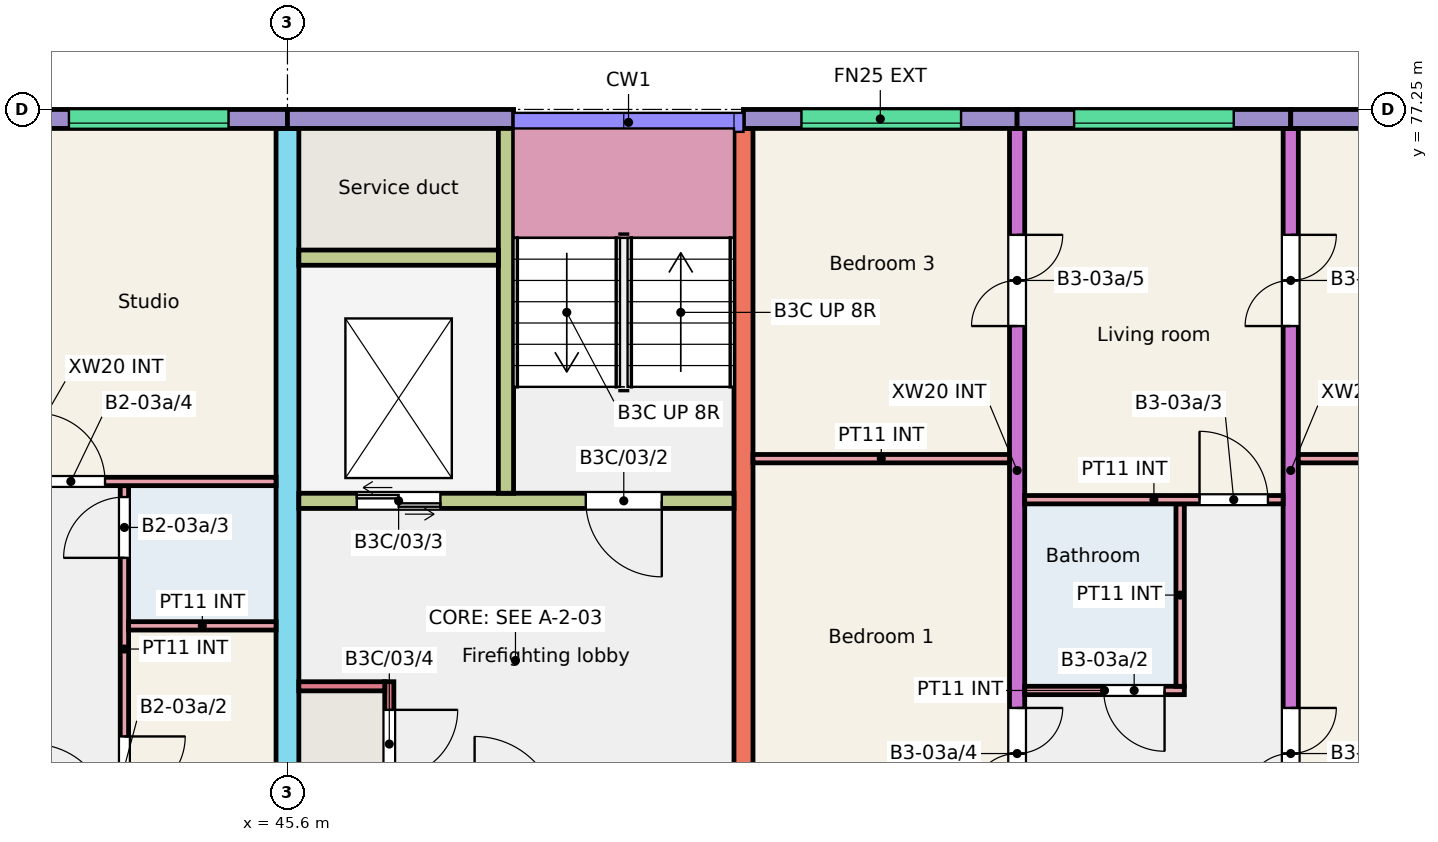
"""IFC4 building model, lengths in metres.
Left out: names, types, materials, properties, quantities, classifications, styles, units other than length and angle.
Written with IfcOpenShell. Run it as: python <this file> out.ifc"""

import sys

from ifc_helpers import new_model, si_unit, direction, frame, frame_2d, origin, place, context, subcontext, project, spatial, rectangle, extrude, element, fill, save


model = new_model("IFC4")
c1 = context("Model", 3, precision=1e-05, world=origin(), true_north=direction((0.0, 1.0)))
c2 = subcontext(c1, "Body", "Model", "MODEL_VIEW")
j1 = project(units=[si_unit("LENGTHUNIT", "METRE"), si_unit("PLANEANGLEUNIT", "RADIAN")], contexts=[c1])
p1 = place(None, origin())
s1 = spatial("IfcSite", under=j1, at=p1, CompositionType="ELEMENT")
p2 = place(p1, origin())
s2 = spatial("IfcBuilding", under=s1, at=p2, CompositionType="ELEMENT")
p3 = place(p2, frame((0.0, 0.0, 9.0)))
s3 = spatial("IfcBuildingStorey", under=s2, at=p3, CompositionType="ELEMENT", Elevation=9.0)
p4 = place(p3, frame((45.6, 66.0, 0.0), z_axis=(0.0, 0.0, 1.0), x_axis=(0.0, 1.0, 0.0)))
e1 = element("IfcWall", 1, at=p4, inside=s3, PredefinedType="SHEAR", context=c2, shape_type="SweptSolid", body=[
    extrude(rectangle(XDim=11.0, YDim=0.3, at=frame_2d((5.5, 0.0))), origin(), (0.0, 0.0, 1.0), 3.0),
])
p5 = place(p4, frame((0.3, 0.0, 0.0)))
e2 = element("IfcOpeningElement", 2, at=p5, cuts=e1, PredefinedType="OPENING", context=c2, shape_type="SweptSolid", body=[
    extrude(rectangle(XDim=1.2, YDim=2.1, at=frame_2d((0.6, 1.05))), frame((0.0, 0.16, 0.0), z_axis=(0.0, -1.0, 0.0), x_axis=(1.0, 0.0, 0.0)), (0.0, 0.0, 1.0), 0.32),
])
p6 = place(p3, frame((51.6, 68.0, 0.0), z_axis=(0.0, 0.0, 1.0), x_axis=(0.0, 1.0, 0.0)))
e3 = element("IfcWall", 3, at=p6, inside=s3, PredefinedType="SHEAR", context=c2, shape_type="SweptSolid", body=[
    extrude(rectangle(XDim=9.0, YDim=0.25, at=frame_2d((4.5, 0.0))), origin(), (0.0, 0.0, 1.0), 3.0),
])
p7 = place(p3, frame((55.2, 68.0, 0.0), z_axis=(0.0, 0.0, 1.0), x_axis=(0.0, 1.0, 0.0)))
e4 = element("IfcWall", 4, at=p7, inside=s3, PredefinedType="SHEAR", context=c2, shape_type="SweptSolid", body=[
    extrude(rectangle(XDim=9.0, YDim=0.2, at=frame_2d((4.5, 0.0))), origin(), (0.0, 0.0, 1.0), 3.0),
])
p8 = place(p7, frame((0.175, 0.0, 0.0)))
e5 = element("IfcOpeningElement", 5, at=p8, cuts=e4, PredefinedType="OPENING", context=c2, shape_type="SweptSolid", body=[
    extrude(rectangle(XDim=1.2, YDim=2.1, at=frame_2d((0.6, 1.05))), frame((0.0, 0.11, 0.0), z_axis=(0.0, -1.0, 0.0), x_axis=(1.0, 0.0, 0.0)), (0.0, 0.0, 1.0), 0.22),
])
p9 = place(p7, frame((6.4, 0.0, 0.0)))
e6 = element("IfcOpeningElement", 6, at=p9, cuts=e4, PredefinedType="OPENING", context=c2, shape_type="SweptSolid", body=[
    extrude(rectangle(XDim=1.2, YDim=2.1, at=frame_2d((0.6, 1.05))), frame((0.0, 0.11, 0.0), z_axis=(0.0, -1.0, 0.0), x_axis=(1.0, 0.0, 0.0)), (0.0, 0.0, 1.0), 0.22),
])
p10 = place(p3, frame((58.8, 68.0, 0.0), z_axis=(0.0, 0.0, 1.0), x_axis=(0.0, 1.0, 0.0)))
e7 = element("IfcWall", 7, at=p10, inside=s3, PredefinedType="SHEAR", context=c2, shape_type="SweptSolid", body=[
    extrude(rectangle(XDim=9.0, YDim=0.2, at=frame_2d((4.5, 0.0))), origin(), (0.0, 0.0, 1.0), 3.0),
])
p11 = place(p10, frame((0.175, 0.0, 0.0)))
e8 = element("IfcOpeningElement", 8, at=p11, cuts=e7, PredefinedType="OPENING", context=c2, shape_type="SweptSolid", body=[
    extrude(rectangle(XDim=1.2, YDim=2.1, at=frame_2d((0.6, 1.05))), frame((0.0, 0.11, 0.0), z_axis=(0.0, -1.0, 0.0), x_axis=(1.0, 0.0, 0.0)), (0.0, 0.0, 1.0), 0.22),
])
p12 = place(p10, frame((6.4, 0.0, 0.0)))
e9 = element("IfcOpeningElement", 9, at=p12, cuts=e7, PredefinedType="OPENING", context=c2, shape_type="SweptSolid", body=[
    extrude(rectangle(XDim=1.2, YDim=2.1, at=frame_2d((0.6, 1.05))), frame((0.0, 0.11, 0.0), z_axis=(0.0, -1.0, 0.0), x_axis=(1.0, 0.0, 0.0)), (0.0, 0.0, 1.0), 0.22),
])
p13 = place(p3, frame((42.0, 77.125, 0.0), z_axis=(0.0, 0.0, 1.0), x_axis=(1.0, 0.0, 0.0)))
e10 = element("IfcWall", 10, at=p13, inside=s3, PredefinedType="SOLIDWALL", context=c2, shape_type="SweptSolid", body=[
    extrude(rectangle(XDim=3.6, YDim=0.25, at=frame_2d((1.8, 0.0))), origin(), (0.0, 0.0, 1.0), 3.0),
])
p14 = place(p13, frame((0.725, 0.0, 1.2)))
e11 = element("IfcOpeningElement", 11, at=p14, cuts=e10, PredefinedType="OPENING", context=c2, shape_type="SweptSolid", body=[
    extrude(rectangle(XDim=2.1, YDim=1.2, at=frame_2d((1.05, 0.6))), frame((0.0, 0.135, 0.0), z_axis=(0.0, -1.0, 0.0), x_axis=(1.0, 0.0, 0.0)), (0.0, 0.0, 1.0), 0.27),
])
p15 = place(p3, frame((45.6, 77.125, 0.0), z_axis=(0.0, 0.0, 1.0), x_axis=(1.0, 0.0, 0.0)))
e12 = element("IfcWall", 12, at=p15, inside=s3, PredefinedType="SOLIDWALL", context=c2, shape_type="SweptSolid", body=[
    extrude(rectangle(XDim=2.975, YDim=0.25, at=frame_2d((1.487, 0.0))), origin(), (0.0, 0.0, 1.0), 3.0),
])
p16 = place(p3, frame((45.75, 72.1, 0.0), z_axis=(0.0, 0.0, 1.0), x_axis=(1.0, 0.0, 0.0)))
e13 = element("IfcWall", 13, at=p16, inside=s3, PredefinedType="SHEAR", context=c2, shape_type="SweptSolid", body=[
    extrude(rectangle(XDim=5.725, YDim=0.2, at=frame_2d((2.863, 0.0))), origin(), (0.0, 0.0, 1.0), 3.0),
])
p17 = place(p16, frame((3.775, 0.0, 0.0)))
e14 = element("IfcOpeningElement", 14, at=p17, cuts=e13, PredefinedType="OPENING", context=c2, shape_type="SweptSolid", body=[
    extrude(rectangle(XDim=1.0, YDim=2.1, at=frame_2d((0.5, 1.05))), frame((0.0, 0.11, 0.0), z_axis=(0.0, -1.0, 0.0), x_axis=(1.0, 0.0, 0.0)), (0.0, 0.0, 1.0), 0.22),
])
p18 = place(p16, frame((0.762, 0.0, 0.0)))
e15 = element("IfcOpeningElement", 15, at=p18, cuts=e13, PredefinedType="OPENING", context=c2, shape_type="SweptSolid", body=[
    extrude(rectangle(XDim=1.1, YDim=2.1, at=frame_2d((0.55, 1.05))), frame((0.0, 0.11, 0.0), z_axis=(0.0, -1.0, 0.0), x_axis=(1.0, 0.0, 0.0)), (0.0, 0.0, 1.0), 0.22),
])
p19 = place(p3, frame((48.475, 72.2, 0.0), z_axis=(0.0, 0.0, 1.0), x_axis=(0.0, 1.0, 0.0)))
e16 = element("IfcWall", 16, at=p19, inside=s3, PredefinedType="SHEAR", context=c2, shape_type="SweptSolid", body=[
    extrude(rectangle(XDim=4.8, YDim=0.2, at=frame_2d((2.4, 0.0))), origin(), (0.0, 0.0, 1.0), 3.0),
])
p20 = place(p3, frame((45.75, 75.3, 0.0), z_axis=(0.0, 0.0, 1.0), x_axis=(1.0, 0.0, 0.0)))
e17 = element("IfcWall", 17, at=p20, inside=s3, PredefinedType="SHEAR", context=c2, shape_type="SweptSolid", body=[
    extrude(rectangle(XDim=2.625, YDim=0.2, at=frame_2d((1.312, 0.0))), origin(), (0.0, 0.0, 1.0), 3.0),
])
p21 = place(p3, frame((46.94, 68.0, 0.0), z_axis=(0.0, 0.0, 1.0), x_axis=(0.0, 1.0, 0.0)))
e18 = element("IfcWall", 18, at=p21, inside=s3, PredefinedType="SHEAR", context=c2, shape_type="SweptSolid", body=[
    extrude(rectangle(XDim=1.72, YDim=0.12, at=frame_2d((0.86, 0.0))), origin(), (0.0, 0.0, 1.0), 3.0),
])
p22 = place(p21, frame((0.45, 0.0, 0.0)))
e19 = element("IfcOpeningElement", 19, at=p22, cuts=e18, PredefinedType="OPENING", context=c2, shape_type="SweptSolid", body=[
    extrude(rectangle(XDim=0.9, YDim=2.1, at=frame_2d((0.45, 1.05))), frame((0.0, 0.07, 0.0), z_axis=(0.0, -1.0, 0.0), x_axis=(1.0, 0.0, 0.0)), (0.0, 0.0, 1.0), 0.14),
])
p23 = place(p3, frame((45.75, 69.66, 0.0), z_axis=(0.0, 0.0, 1.0), x_axis=(1.0, 0.0, 0.0)))
e20 = element("IfcWall", 20, at=p23, inside=s3, PredefinedType="SHEAR", context=c2, shape_type="SweptSolid", body=[
    extrude(rectangle(XDim=1.13, YDim=0.12, at=frame_2d((0.565, 0.0))), origin(), (0.0, 0.0, 1.0), 3.0),
])
p24 = place(p3, frame((51.6, 77.125, 0.0), z_axis=(0.0, 0.0, 1.0), x_axis=(1.0, 0.0, 0.0)))
e21 = element("IfcWall", 21, at=p24, inside=s3, PredefinedType="SOLIDWALL", context=c2, shape_type="SweptSolid", body=[
    extrude(rectangle(XDim=3.6, YDim=0.25, at=frame_2d((1.8, 0.0))), origin(), (0.0, 0.0, 1.0), 3.0),
])
p25 = place(p24, frame((0.762, 0.0, 1.2)))
e22 = element("IfcOpeningElement", 22, at=p25, cuts=e21, PredefinedType="OPENING", context=c2, shape_type="SweptSolid", body=[
    extrude(rectangle(XDim=2.1, YDim=1.2, at=frame_2d((1.05, 0.6))), frame((0.0, 0.135, 0.0), z_axis=(0.0, -1.0, 0.0), x_axis=(1.0, 0.0, 0.0)), (0.0, 0.0, 1.0), 0.27),
])
p26 = place(p3, frame((55.2, 77.125, 0.0), z_axis=(0.0, 0.0, 1.0), x_axis=(1.0, 0.0, 0.0)))
e23 = element("IfcWall", 23, at=p26, inside=s3, PredefinedType="SOLIDWALL", context=c2, shape_type="SweptSolid", body=[
    extrude(rectangle(XDim=3.6, YDim=0.25, at=frame_2d((1.8, 0.0))), origin(), (0.0, 0.0, 1.0), 3.0),
])
p27 = place(p26, frame((0.75, 0.0, 1.2)))
e24 = element("IfcOpeningElement", 24, at=p27, cuts=e23, PredefinedType="OPENING", context=c2, shape_type="SweptSolid", body=[
    extrude(rectangle(XDim=2.1, YDim=1.2, at=frame_2d((1.05, 0.6))), frame((0.0, 0.135, 0.0), z_axis=(0.0, -1.0, 0.0), x_axis=(1.0, 0.0, 0.0)), (0.0, 0.0, 1.0), 0.27),
])
p28 = place(p3, frame((58.8, 77.125, 0.0), z_axis=(0.0, 0.0, 1.0), x_axis=(1.0, 0.0, 0.0)))
e25 = element("IfcWall", 25, at=p28, inside=s3, PredefinedType="SOLIDWALL", context=c2, shape_type="SweptSolid", body=[
    extrude(rectangle(XDim=3.6, YDim=0.25, at=frame_2d((1.8, 0.0))), origin(), (0.0, 0.0, 1.0), 3.0),
])
p29 = place(p28, frame((1.175, 0.0, 1.1)))
e26 = element("IfcOpeningElement", 26, at=p29, cuts=e25, PredefinedType="OPENING", context=c2, shape_type="SweptSolid", body=[
    extrude(rectangle(XDim=1.2, YDim=1.3, at=frame_2d((0.6, 0.65))), frame((0.0, 0.135, 0.0), z_axis=(0.0, -1.0, 0.0), x_axis=(1.0, 0.0, 0.0)), (0.0, 0.0, 1.0), 0.27),
])
p30 = place(p3, frame((43.455, 68.0, 0.0), z_axis=(0.0, 0.0, 1.0), x_axis=(0.0, 1.0, 0.0)))
e27 = element("IfcWall", 27, at=p30, inside=s3, PredefinedType="PARTITIONING", context=c2, shape_type="SweptSolid", body=[
    extrude(rectangle(XDim=4.3, YDim=0.11, at=frame_2d((2.15, 0.0))), origin(), (0.0, 0.0, 1.0), 2.8),
])
p31 = place(p30, frame((0.2, 0.0, 0.0)))
e28 = element("IfcOpeningElement", 28, at=p31, cuts=e27, PredefinedType="OPENING", context=c2, shape_type="SweptSolid", body=[
    extrude(rectangle(XDim=0.8, YDim=2.1, at=frame_2d((0.4, 1.05))), frame((0.0, 0.065, 0.0), z_axis=(0.0, -1.0, 0.0), x_axis=(1.0, 0.0, 0.0)), (0.0, 0.0, 1.0), 0.13),
])
p32 = place(p30, frame((3.35, 0.0, 0.0)))
e29 = element("IfcOpeningElement", 29, at=p32, cuts=e27, PredefinedType="OPENING", context=c2, shape_type="SweptSolid", body=[
    extrude(rectangle(XDim=0.8, YDim=2.1, at=frame_2d((0.4, 1.05))), frame((0.0, 0.065, 0.0), z_axis=(0.0, -1.0, 0.0), x_axis=(1.0, 0.0, 0.0)), (0.0, 0.0, 1.0), 0.13),
])
p33 = place(p3, frame((43.51, 70.455, 0.0), z_axis=(0.0, 0.0, 1.0), x_axis=(1.0, 0.0, 0.0)))
e30 = element("IfcWall", 30, at=p33, inside=s3, PredefinedType="PARTITIONING", context=c2, shape_type="SweptSolid", body=[
    extrude(rectangle(XDim=1.94, YDim=0.11, at=frame_2d((0.97, 0.0))), origin(), (0.0, 0.0, 1.0), 2.8),
])
p34 = place(p3, frame((42.1, 72.355, 0.0), z_axis=(0.0, 0.0, 1.0), x_axis=(1.0, 0.0, 0.0)))
e31 = element("IfcWall", 31, at=p34, inside=s3, PredefinedType="PARTITIONING", context=c2, shape_type="SweptSolid", body=[
    extrude(rectangle(XDim=3.35, YDim=0.11, at=frame_2d((1.675, 0.0))), origin(), (0.0, 0.0, 1.0), 2.8),
])
p35 = place(p34, frame((0.2, 0.0, 0.0)))
e32 = element("IfcOpeningElement", 32, at=p35, cuts=e31, PredefinedType="OPENING", context=c2, shape_type="SweptSolid", body=[
    extrude(rectangle(XDim=0.9, YDim=2.1, at=frame_2d((0.45, 1.05))), frame((0.0, 0.065, 0.0), z_axis=(0.0, -1.0, 0.0), x_axis=(1.0, 0.0, 0.0)), (0.0, 0.0, 1.0), 0.13),
])
p36 = place(p3, frame((55.3, 69.605, 0.0), z_axis=(0.0, 0.0, 1.0), x_axis=(1.0, 0.0, 0.0)))
e33 = element("IfcWall", 33, at=p36, inside=s3, PredefinedType="PARTITIONING", context=c2, shape_type="SweptSolid", body=[
    extrude(rectangle(XDim=2.1, YDim=0.11, at=frame_2d((1.05, 0.0))), origin(), (0.0, 0.0, 1.0), 2.8),
])
p37 = place(p36, frame((1.04, 0.0, 0.0)))
e34 = element("IfcOpeningElement", 34, at=p37, cuts=e33, PredefinedType="OPENING", context=c2, shape_type="SweptSolid", body=[
    extrude(rectangle(XDim=0.8, YDim=2.1, at=frame_2d((0.4, 1.05))), frame((0.0, 0.065, 0.0), z_axis=(0.0, -1.0, 0.0), x_axis=(1.0, 0.0, 0.0)), (0.0, 0.0, 1.0), 0.13),
])
p38 = place(p3, frame((57.345, 69.66, 0.0), z_axis=(0.0, 0.0, 1.0), x_axis=(0.0, 1.0, 0.0)))
e35 = element("IfcWall", 35, at=p38, inside=s3, PredefinedType="PARTITIONING", context=c2, shape_type="SweptSolid", body=[
    extrude(rectangle(XDim=2.4, YDim=0.11, at=frame_2d((1.2, 0.0))), origin(), (0.0, 0.0, 1.0), 2.8),
])
p39 = place(p3, frame((55.3, 72.115, 0.0), z_axis=(0.0, 0.0, 1.0), x_axis=(1.0, 0.0, 0.0)))
e36 = element("IfcWall", 36, at=p39, inside=s3, PredefinedType="PARTITIONING", context=c2, shape_type="SweptSolid", body=[
    extrude(rectangle(XDim=3.4, YDim=0.11, at=frame_2d((1.7, 0.0))), origin(), (0.0, 0.0, 1.0), 2.8),
])
p40 = place(p39, frame((2.3, 0.0, 0.0)))
e37 = element("IfcOpeningElement", 37, at=p40, cuts=e36, PredefinedType="OPENING", context=c2, shape_type="SweptSolid", body=[
    extrude(rectangle(XDim=0.9, YDim=2.1, at=frame_2d((0.45, 1.05))), frame((0.0, 0.065, 0.0), z_axis=(0.0, -1.0, 0.0), x_axis=(1.0, 0.0, 0.0)), (0.0, 0.0, 1.0), 0.13),
])
p41 = place(p3, frame((51.725, 72.655, 0.0), z_axis=(0.0, 0.0, 1.0), x_axis=(1.0, 0.0, 0.0)))
e38 = element("IfcWall", 38, at=p41, inside=s3, PredefinedType="PARTITIONING", context=c2, shape_type="SweptSolid", body=[
    extrude(rectangle(XDim=3.375, YDim=0.11, at=frame_2d((1.688, 0.0))), origin(), (0.0, 0.0, 1.0), 2.8),
])
p42 = place(p3, frame((58.9, 72.655, 0.0), z_axis=(0.0, 0.0, 1.0), x_axis=(1.0, 0.0, 0.0)))
e39 = element("IfcWall", 39, at=p42, inside=s3, PredefinedType="PARTITIONING", context=c2, shape_type="SweptSolid", body=[
    extrude(rectangle(XDim=3.35, YDim=0.11, at=frame_2d((1.675, 0.0))), origin(), (0.0, 0.0, 1.0), 2.8),
])
p43 = place(p14, origin())
e40 = element("IfcWindow", 40, at=p43, inside=s3, PartitioningType="SINGLE_PANEL", PredefinedType="WINDOW", context=c2, shape_type="SweptSolid", body=[
    extrude(rectangle(XDim=2.1, YDim=1.2, at=frame_2d((1.05, 0.6))), frame((0.0, -0.025, 0.0), z_axis=(0.0, -1.0, 0.0), x_axis=(1.0, 0.0, 0.0)), (0.0, 0.0, 1.0), 0.06),
])
fill(e11, e40)
p44 = place(p25, origin())
e41 = element("IfcWindow", 41, at=p44, inside=s3, PartitioningType="SINGLE_PANEL", PredefinedType="WINDOW", context=c2, shape_type="SweptSolid", body=[
    extrude(rectangle(XDim=2.1, YDim=1.2, at=frame_2d((1.05, 0.6))), frame((0.0, -0.025, 0.0), z_axis=(0.0, -1.0, 0.0), x_axis=(1.0, 0.0, 0.0)), (0.0, 0.0, 1.0), 0.06),
])
fill(e22, e41)
p45 = place(p27, origin())
e42 = element("IfcWindow", 42, at=p45, inside=s3, PartitioningType="SINGLE_PANEL", PredefinedType="WINDOW", context=c2, shape_type="SweptSolid", body=[
    extrude(rectangle(XDim=2.1, YDim=1.2, at=frame_2d((1.05, 0.6))), frame((0.0, -0.025, 0.0), z_axis=(0.0, -1.0, 0.0), x_axis=(1.0, 0.0, 0.0)), (0.0, 0.0, 1.0), 0.06),
])
fill(e24, e42)
p46 = place(p31, origin())
e43 = element("IfcDoor", 43, at=p46, inside=s3, OperationType="SINGLE_SWING_RIGHT", PredefinedType="DOOR", context=c2, shape_type="SweptSolid", body=[
    extrude(rectangle(XDim=0.8, YDim=2.1, at=frame_2d((0.4, 1.05))), frame((0.0, 0.025, 0.0), z_axis=(0.0, -1.0, 0.0), x_axis=(1.0, 0.0, 0.0)), (0.0, 0.0, 1.0), 0.05),
])
fill(e28, e43)
p47 = place(p32, origin())
e44 = element("IfcDoor", 44, at=p47, inside=s3, OperationType="SINGLE_SWING_LEFT", PredefinedType="DOOR", context=c2, shape_type="SweptSolid", body=[
    extrude(rectangle(XDim=0.8, YDim=2.1, at=frame_2d((0.4, 1.05))), frame((0.0, 0.025, 0.0), z_axis=(0.0, -1.0, 0.0), x_axis=(1.0, 0.0, 0.0)), (0.0, 0.0, 1.0), 0.05),
])
fill(e29, e44)
p48 = place(p35, origin())
e45 = element("IfcDoor", 45, at=p48, inside=s3, OperationType="SINGLE_SWING_LEFT", PredefinedType="DOOR", context=c2, shape_type="SweptSolid", body=[
    extrude(rectangle(XDim=0.9, YDim=2.1, at=frame_2d((0.45, 1.05))), frame((0.0, 0.025, 0.0), z_axis=(0.0, -1.0, 0.0), x_axis=(1.0, 0.0, 0.0)), (0.0, 0.0, 1.0), 0.05),
])
fill(e32, e45)
p49 = place(p37, origin())
e46 = element("IfcDoor", 46, at=p49, inside=s3, OperationType="SINGLE_SWING_RIGHT", PredefinedType="DOOR", context=c2, shape_type="SweptSolid", body=[
    extrude(rectangle(XDim=0.8, YDim=2.1, at=frame_2d((0.4, 1.05))), frame((0.0, 0.025, 0.0), z_axis=(0.0, -1.0, 0.0), x_axis=(1.0, 0.0, 0.0)), (0.0, 0.0, 1.0), 0.05),
])
fill(e34, e46)
p50 = place(p40, origin())
e47 = element("IfcDoor", 47, at=p50, inside=s3, OperationType="SINGLE_SWING_LEFT", PredefinedType="DOOR", context=c2, shape_type="SweptSolid", body=[
    extrude(rectangle(XDim=0.9, YDim=2.1, at=frame_2d((0.45, 1.05))), frame((0.0, 0.025, 0.0), z_axis=(0.0, -1.0, 0.0), x_axis=(1.0, 0.0, 0.0)), (0.0, 0.0, 1.0), 0.05),
])
fill(e37, e47)
p51 = place(p8, origin())
e48 = element("IfcDoor", 48, at=p51, inside=s3, OperationType="DOUBLE_DOOR_SINGLE_SWING", PredefinedType="DOOR", context=c2, shape_type="SweptSolid", body=[
    extrude(rectangle(XDim=1.2, YDim=2.1, at=frame_2d((0.6, 1.05))), frame((0.0, 0.025, 0.0), z_axis=(0.0, -1.0, 0.0), x_axis=(1.0, 0.0, 0.0)), (0.0, 0.0, 1.0), 0.05),
])
fill(e5, e48)
p52 = place(p9, origin())
e49 = element("IfcDoor", 49, at=p52, inside=s3, OperationType="DOUBLE_DOOR_SINGLE_SWING", PredefinedType="DOOR", context=c2, shape_type="SweptSolid", body=[
    extrude(rectangle(XDim=1.2, YDim=2.1, at=frame_2d((0.6, 1.05))), frame((0.0, 0.025, 0.0), z_axis=(0.0, -1.0, 0.0), x_axis=(1.0, 0.0, 0.0)), (0.0, 0.0, 1.0), 0.05),
])
fill(e6, e49)
p53 = place(p11, origin())
e50 = element("IfcDoor", 50, at=p53, inside=s3, OperationType="DOUBLE_DOOR_SINGLE_SWING", PredefinedType="DOOR", context=c2, shape_type="SweptSolid", body=[
    extrude(rectangle(XDim=1.2, YDim=2.1, at=frame_2d((0.6, 1.05))), frame((0.0, 0.025, 0.0), z_axis=(0.0, -1.0, 0.0), x_axis=(1.0, 0.0, 0.0)), (0.0, 0.0, 1.0), 0.05),
])
fill(e8, e50)
p54 = place(p12, origin())
e51 = element("IfcDoor", 51, at=p54, inside=s3, OperationType="DOUBLE_DOOR_SINGLE_SWING", PredefinedType="DOOR", context=c2, shape_type="SweptSolid", body=[
    extrude(rectangle(XDim=1.2, YDim=2.1, at=frame_2d((0.6, 1.05))), frame((0.0, 0.025, 0.0), z_axis=(0.0, -1.0, 0.0), x_axis=(1.0, 0.0, 0.0)), (0.0, 0.0, 1.0), 0.05),
])
fill(e9, e51)
p55 = place(p17, origin())
e52 = element("IfcDoor", 52, at=p55, inside=s3, OperationType="SINGLE_SWING_RIGHT", PredefinedType="DOOR", context=c2, shape_type="SweptSolid", body=[
    extrude(rectangle(XDim=1.0, YDim=2.1, at=frame_2d((0.5, 1.05))), frame((0.0, 0.025, 0.0), z_axis=(0.0, -1.0, 0.0), x_axis=(1.0, 0.0, 0.0)), (0.0, 0.0, 1.0), 0.05),
])
fill(e14, e52)
p56 = place(p18, origin())
e53 = element("IfcDoor", 53, at=p56, inside=s3, OperationType="DOUBLE_DOOR_SLIDING", PredefinedType="DOOR", context=c2, shape_type="SweptSolid", body=[
    extrude(rectangle(XDim=1.1, YDim=2.1, at=frame_2d((0.55, 1.05))), frame((0.0, 0.025, 0.0), z_axis=(0.0, -1.0, 0.0), x_axis=(1.0, 0.0, 0.0)), (0.0, 0.0, 1.0), 0.05),
])
fill(e15, e53)
p57 = place(p22, origin())
e54 = element("IfcDoor", 54, at=p57, inside=s3, OperationType="SINGLE_SWING_RIGHT", PredefinedType="DOOR", context=c2, shape_type="SweptSolid", body=[
    extrude(rectangle(XDim=0.9, YDim=2.1, at=frame_2d((0.45, 1.05))), frame((0.0, 0.025, 0.0), z_axis=(0.0, -1.0, 0.0), x_axis=(1.0, 0.0, 0.0)), (0.0, 0.0, 1.0), 0.05),
])
fill(e19, e54)
save(model, sys.argv[1])
